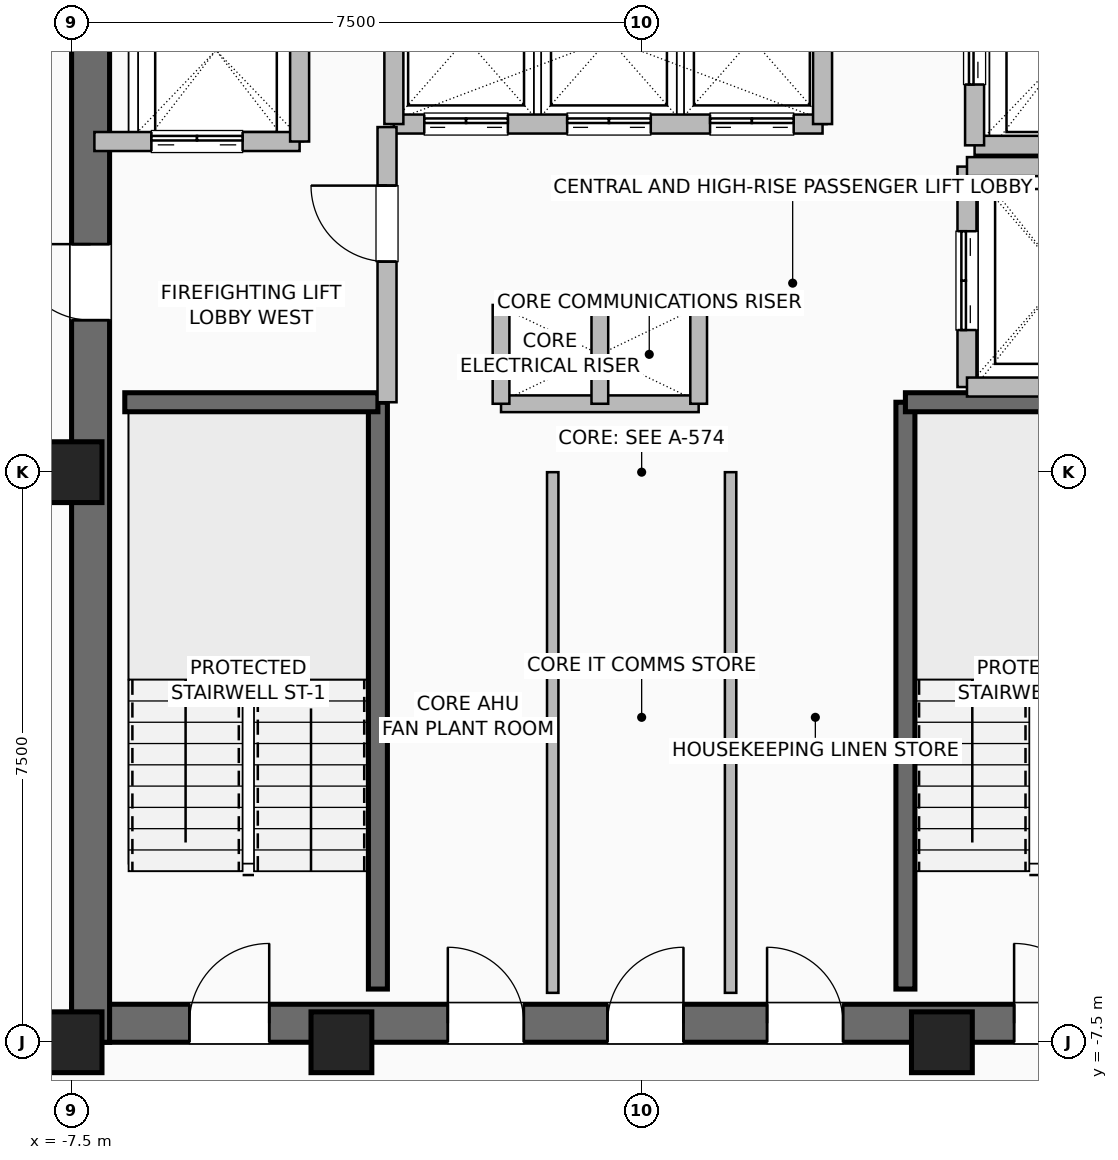
"""IFC4 building model, lengths in metres.
Left out: names, types, materials, properties, quantities, classifications, styles, units other than length and angle.
Written with IfcOpenShell. Run it as: python <this file> out.ifc"""

import sys

from ifc_helpers import new_model, si_unit, direction, frame, frame_2d, origin, origin_2d, place, context, subcontext, project, spatial, rectangle, hollow_rectangle, extrude, element, fill, save


model = new_model("IFC4")
c1 = context("Model", 3, precision=1e-05, world=origin(), true_north=direction((0.0, 1.0)))
c2 = subcontext(c1, "Body", "Model", "MODEL_VIEW")
j1 = project(units=[si_unit("LENGTHUNIT", "METRE"), si_unit("PLANEANGLEUNIT", "RADIAN")], contexts=[c1])
p1 = place(None, origin())
s1 = spatial("IfcSite", under=j1, at=p1, CompositionType="ELEMENT")
p2 = place(p1, origin())
s2 = spatial("IfcBuilding", under=s1, at=p2, CompositionType="ELEMENT")
p3 = place(p2, frame((0.0, 0.0, 293.6)))
s3 = spatial("IfcBuildingStorey", under=s2, at=p3, CompositionType="ELEMENT", Elevation=293.6)
for number, where, z_axis, x_axis in (
    (1, (-7.5, -7.5, 0.0), (0.0, 0.0, 1.0), (1.0, 0.0, 0.0)),
    (2, (-3.95, -7.5, 0.0), (0.0, 0.0, 1.0), (1.0, 0.0, 0.0)),
    (3, (3.95, -7.5, 0.0), (0.0, 0.0, 1.0), (1.0, 0.0, 0.0)),
    (4, (-7.5, 0.0, 0.0), (0.0, 0.0, 1.0), (1.0, 0.0, 0.0)),
):
    element("IfcColumn", number, at=place(p3, frame(where, z_axis=z_axis, x_axis=x_axis)), inside=s3, PredefinedType="COLUMN", context=c2, shape_type="SweptSolid", body=[
        extrude(hollow_rectangle(XDim=0.8, YDim=0.8, WallThickness=0.04, at=origin_2d()), origin(), (0.0, 0.0, 1.0), 3.6),
    ])
p4 = place(p3, frame((-7.5, -7.25, 0.0), z_axis=(0.0, 0.0, 1.0), x_axis=(1.0, 0.0, 0.0)))
e5 = element("IfcWall", 5, at=p4, inside=s3, PredefinedType="SHEAR", context=c2, shape_type="SweptSolid", body=[
    extrude(rectangle(XDim=15.0, YDim=0.5, at=frame_2d((7.5, 0.0))), origin(), (0.0, 0.0, 1.0), 3.36),
])
p5 = place(p4, frame((1.55, 0.0, 0.0)))
e6 = element("IfcOpeningElement", 6, at=p5, cuts=e5, PredefinedType="OPENING", context=c2, shape_type="SweptSolid", body=[
    extrude(rectangle(XDim=1.05, YDim=2.08, at=frame_2d((0.525, 1.04))), frame((0.0, 0.26, 0.0), z_axis=(0.0, -1.0, 0.0), x_axis=(1.0, 0.0, 0.0)), (0.0, 0.0, 1.0), 0.52),
])
p6 = place(p4, frame((12.4, 0.0, 0.0)))
e7 = element("IfcOpeningElement", 7, at=p6, cuts=e5, PredefinedType="OPENING", context=c2, shape_type="SweptSolid", body=[
    extrude(rectangle(XDim=1.05, YDim=2.08, at=frame_2d((0.525, 1.04))), frame((0.0, 0.26, 0.0), z_axis=(0.0, -1.0, 0.0), x_axis=(1.0, 0.0, 0.0)), (0.0, 0.0, 1.0), 0.52),
])
p7 = place(p4, frame((4.95, 0.0, 0.0)))
e8 = element("IfcOpeningElement", 8, at=p7, cuts=e5, PredefinedType="OPENING", context=c2, shape_type="SweptSolid", body=[
    extrude(rectangle(XDim=1.0, YDim=2.08, at=frame_2d((0.5, 1.04))), frame((0.0, 0.26, 0.0), z_axis=(0.0, -1.0, 0.0), x_axis=(1.0, 0.0, 0.0)), (0.0, 0.0, 1.0), 0.52),
])
p8 = place(p4, frame((7.05, 0.0, 0.0)))
e9 = element("IfcOpeningElement", 9, at=p8, cuts=e5, PredefinedType="OPENING", context=c2, shape_type="SweptSolid", body=[
    extrude(rectangle(XDim=1.0, YDim=2.08, at=frame_2d((0.5, 1.04))), frame((0.0, 0.26, 0.0), z_axis=(0.0, -1.0, 0.0), x_axis=(1.0, 0.0, 0.0)), (0.0, 0.0, 1.0), 0.52),
])
p9 = place(p4, frame((9.15, 0.0, 0.0)))
e10 = element("IfcOpeningElement", 10, at=p9, cuts=e5, PredefinedType="OPENING", context=c2, shape_type="SweptSolid", body=[
    extrude(rectangle(XDim=1.0, YDim=2.08, at=frame_2d((0.5, 1.04))), frame((0.0, 0.26, 0.0), z_axis=(0.0, -1.0, 0.0), x_axis=(1.0, 0.0, 0.0)), (0.0, 0.0, 1.0), 0.52),
])
p10 = place(p3, frame((-7.25, -7.5, 0.0), z_axis=(0.0, 0.0, 1.0), x_axis=(0.0, 1.0, 0.0)))
e11 = element("IfcWall", 11, at=p10, inside=s3, PredefinedType="SHEAR", context=c2, shape_type="SweptSolid", body=[
    extrude(rectangle(XDim=15.0, YDim=0.5, at=frame_2d((7.5, 0.0))), origin(), (0.0, 0.0, 1.0), 3.36),
])
p11 = place(p10, frame((9.5, 0.0, 0.0)))
e12 = element("IfcOpeningElement", 12, at=p11, cuts=e11, PredefinedType="OPENING", context=c2, shape_type="SweptSolid", body=[
    extrude(rectangle(XDim=1.0, YDim=2.08, at=frame_2d((0.5, 1.04))), frame((0.0, 0.26, 0.0), z_axis=(0.0, -1.0, 0.0), x_axis=(1.0, 0.0, 0.0)), (0.0, 0.0, 1.0), 0.52),
])
p12 = place(p3, frame((-3.47, -6.8, 0.0), z_axis=(0.0, 0.0, 1.0), x_axis=(0.0, 1.0, 0.0)))
e13 = element("IfcWall", 13, at=p12, inside=s3, PredefinedType="SHEAR", context=c2, shape_type="SweptSolid", body=[
    extrude(rectangle(XDim=7.72, YDim=0.25, at=frame_2d((3.86, 0.0))), origin(), (0.0, 0.0, 1.0), 3.36),
])
p13 = place(p3, frame((-6.8, 0.92, 0.0), z_axis=(0.0, 0.0, 1.0), x_axis=(1.0, 0.0, 0.0)))
e14 = element("IfcWall", 14, at=p13, inside=s3, PredefinedType="SHEAR", context=c2, shape_type="SweptSolid", body=[
    extrude(rectangle(XDim=3.33, YDim=0.25, at=frame_2d((1.665, 0.0))), origin(), (0.0, 0.0, 1.0), 3.36),
])
p14 = place(p3, frame((3.47, -6.8, 0.0), z_axis=(0.0, 0.0, 1.0), x_axis=(0.0, 1.0, 0.0)))
e15 = element("IfcWall", 15, at=p14, inside=s3, PredefinedType="SHEAR", context=c2, shape_type="SweptSolid", body=[
    extrude(rectangle(XDim=7.72, YDim=0.25, at=frame_2d((3.86, 0.0))), origin(), (0.0, 0.0, 1.0), 3.36),
])
p15 = place(p3, frame((3.47, 0.92, 0.0), z_axis=(0.0, 0.0, 1.0), x_axis=(1.0, 0.0, 0.0)))
e16 = element("IfcWall", 16, at=p15, inside=s3, PredefinedType="SHEAR", context=c2, shape_type="SweptSolid", body=[
    extrude(rectangle(XDim=3.33, YDim=0.25, at=frame_2d((1.665, 0.0))), origin(), (0.0, 0.0, 1.0), 3.36),
])
for number, where, z_axis, x_axis in (
    (17, (-1.85, 2.2, 0.0), (0.0, 0.0, 1.0), (1.0, 0.0, 0.0)),
    (18, (-1.85, 0.9, 0.0), (0.0, 0.0, 1.0), (1.0, 0.0, 0.0)),
):
    element("IfcWall", number, at=place(p3, frame(where, z_axis=z_axis, x_axis=x_axis)), inside=s3, PredefinedType="PARTITIONING", context=c2, shape_type="SweptSolid", body=[
        extrude(rectangle(XDim=2.6, YDim=0.22, at=frame_2d((1.3, 0.0))), origin(), (0.0, 0.0, 1.0), 3.36),
    ])
for number, where, z_axis, x_axis in (
    (19, (-0.55, 0.9, 0.0), (0.0, 0.0, 1.0), (0.0, 1.0, 0.0)),
    (20, (0.75, 0.9, 0.0), (0.0, 0.0, 1.0), (0.0, 1.0, 0.0)),
    (21, (-1.85, 0.9, 0.0), (0.0, 0.0, 1.0), (0.0, 1.0, 0.0)),
):
    element("IfcWall", number, at=place(p3, frame(where, z_axis=z_axis, x_axis=x_axis)), inside=s3, PredefinedType="PARTITIONING", context=c2, shape_type="SweptSolid", body=[
        extrude(rectangle(XDim=1.3, YDim=0.22, at=frame_2d((0.65, 0.0))), origin(), (0.0, 0.0, 1.0), 3.36),
    ])
p16 = place(p3, frame((-3.26, 4.58, 0.0), z_axis=(0.0, 0.0, 1.0), x_axis=(1.0, 0.0, 0.0)))
e22 = element("IfcWall", 22, at=p16, inside=s3, PredefinedType="SHEAR", context=c2, shape_type="SweptSolid", body=[
    extrude(rectangle(XDim=5.64, YDim=0.25, at=frame_2d((2.82, 0.0))), origin(), (0.0, 0.0, 1.0), 3.36),
])
p17 = place(p16, frame((0.4, 0.0, 0.0)))
e23 = element("IfcOpeningElement", 23, at=p17, cuts=e22, PredefinedType="OPENING", context=c2, shape_type="SweptSolid", body=[
    extrude(rectangle(XDim=1.1, YDim=2.2, at=frame_2d((0.55, 1.1))), frame((0.0, 0.135, 0.0), z_axis=(0.0, -1.0, 0.0), x_axis=(1.0, 0.0, 0.0)), (0.0, 0.0, 1.0), 0.27),
])
p18 = place(p16, frame((2.28, 0.0, 0.0)))
e24 = element("IfcOpeningElement", 24, at=p18, cuts=e22, PredefinedType="OPENING", context=c2, shape_type="SweptSolid", body=[
    extrude(rectangle(XDim=1.1, YDim=2.2, at=frame_2d((0.55, 1.1))), frame((0.0, 0.135, 0.0), z_axis=(0.0, -1.0, 0.0), x_axis=(1.0, 0.0, 0.0)), (0.0, 0.0, 1.0), 0.27),
])
p19 = place(p16, frame((4.16, 0.0, 0.0)))
e25 = element("IfcOpeningElement", 25, at=p19, cuts=e22, PredefinedType="OPENING", context=c2, shape_type="SweptSolid", body=[
    extrude(rectangle(XDim=1.1, YDim=2.2, at=frame_2d((0.55, 1.1))), frame((0.0, 0.135, 0.0), z_axis=(0.0, -1.0, 0.0), x_axis=(1.0, 0.0, 0.0)), (0.0, 0.0, 1.0), 0.27),
])
for number, where, z_axis, x_axis in (
    (26, (-3.26, 4.58, 0.0), (0.0, 0.0, 1.0), (0.0, 1.0, 0.0)),
    (27, (2.38, 4.58, 0.0), (0.0, 0.0, 1.0), (0.0, 1.0, 0.0)),
):
    element("IfcWall", number, at=place(p3, frame(where, z_axis=z_axis, x_axis=x_axis)), inside=s3, PredefinedType="SHEAR", context=c2, shape_type="SweptSolid", body=[
        extrude(rectangle(XDim=2.22, YDim=0.25, at=frame_2d((1.11, 0.0))), origin(), (0.0, 0.0, 1.0), 3.36),
    ])
p20 = place(p3, frame((-7.2, 4.35, 0.0), z_axis=(0.0, 0.0, 1.0), x_axis=(1.0, 0.0, 0.0)))
e28 = element("IfcWall", 28, at=p20, inside=s3, PredefinedType="SHEAR", context=c2, shape_type="SweptSolid", body=[
    extrude(rectangle(XDim=2.7, YDim=0.25, at=frame_2d((1.35, 0.0))), origin(), (0.0, 0.0, 1.0), 3.36),
])
p21 = place(p20, frame((0.75, 0.0, 0.0)))
e29 = element("IfcOpeningElement", 29, at=p21, cuts=e28, PredefinedType="OPENING", context=c2, shape_type="SweptSolid", body=[
    extrude(rectangle(XDim=1.2, YDim=2.2, at=frame_2d((0.6, 1.1))), frame((0.0, 0.135, 0.0), z_axis=(0.0, -1.0, 0.0), x_axis=(1.0, 0.0, 0.0)), (0.0, 0.0, 1.0), 0.27),
])
p22 = place(p3, frame((-4.5, 4.35, 0.0), z_axis=(0.0, 0.0, 1.0), x_axis=(0.0, 1.0, 0.0)))
e30 = element("IfcWall", 30, at=p22, inside=s3, PredefinedType="SHEAR", context=c2, shape_type="SweptSolid", body=[
    extrude(rectangle(XDim=2.85, YDim=0.25, at=frame_2d((1.425, 0.0))), origin(), (0.0, 0.0, 1.0), 3.36),
])
p23 = place(p3, frame((4.38, 4.3, 0.0), z_axis=(0.0, 0.0, 1.0), x_axis=(1.0, 0.0, 0.0)))
e31 = element("IfcWall", 31, at=p23, inside=s3, PredefinedType="SHEAR", context=c2, shape_type="SweptSolid", body=[
    extrude(rectangle(XDim=2.42, YDim=0.25, at=frame_2d((1.21, 0.0))), origin(), (0.0, 0.0, 1.0), 3.36),
])
p24 = place(p3, frame((4.38, 4.3, 0.0), z_axis=(0.0, 0.0, 1.0), x_axis=(0.0, 1.0, 0.0)))
e32 = element("IfcWall", 32, at=p24, inside=s3, PredefinedType="SHEAR", context=c2, shape_type="SweptSolid", body=[
    extrude(rectangle(XDim=2.5, YDim=0.25, at=frame_2d((1.25, 0.0))), origin(), (0.0, 0.0, 1.0), 3.36),
])
p25 = place(p24, frame((0.8, 0.0, 0.0)))
e33 = element("IfcOpeningElement", 33, at=p25, cuts=e32, PredefinedType="OPENING", context=c2, shape_type="SweptSolid", body=[
    extrude(rectangle(XDim=1.2, YDim=2.2, at=frame_2d((0.6, 1.1))), frame((0.0, 0.135, 0.0), z_axis=(0.0, -1.0, 0.0), x_axis=(1.0, 0.0, 0.0)), (0.0, 0.0, 1.0), 0.27),
])
p26 = place(p3, frame((4.28, 1.12, 0.0), z_axis=(0.0, 0.0, 1.0), x_axis=(0.0, 1.0, 0.0)))
e34 = element("IfcWall", 34, at=p26, inside=s3, PredefinedType="SHEAR", context=c2, shape_type="SweptSolid", body=[
    extrude(rectangle(XDim=2.9, YDim=0.25, at=frame_2d((1.45, 0.0))), origin(), (0.0, 0.0, 1.0), 3.36),
])
p27 = place(p26, frame((0.75, 0.0, 0.0)))
e35 = element("IfcOpeningElement", 35, at=p27, cuts=e34, PredefinedType="OPENING", context=c2, shape_type="SweptSolid", body=[
    extrude(rectangle(XDim=1.3, YDim=2.3, at=frame_2d((0.65, 1.15))), frame((0.0, 0.135, 0.0), z_axis=(0.0, -1.0, 0.0), x_axis=(1.0, 0.0, 0.0)), (0.0, 0.0, 1.0), 0.27),
])
for number, where, z_axis, x_axis in (
    (36, (4.28, 1.12, 0.0), (0.0, 0.0, 1.0), (1.0, 0.0, 0.0)),
    (37, (4.28, 4.02, 0.0), (0.0, 0.0, 1.0), (1.0, 0.0, 0.0)),
):
    element("IfcWall", number, at=place(p3, frame(where, z_axis=z_axis, x_axis=x_axis)), inside=s3, PredefinedType="SHEAR", context=c2, shape_type="SweptSolid", body=[
        extrude(rectangle(XDim=2.52, YDim=0.25, at=frame_2d((1.26, 0.0))), origin(), (0.0, 0.0, 1.0), 3.36),
    ])
p28 = place(p3, frame((-3.35, 0.92, 0.0), z_axis=(0.0, 0.0, 1.0), x_axis=(0.0, 1.0, 0.0)))
e38 = element("IfcWall", 38, at=p28, inside=s3, PredefinedType="SHEAR", context=c2, shape_type="SweptSolid", body=[
    extrude(rectangle(XDim=3.62, YDim=0.25, at=frame_2d((1.81, 0.0))), origin(), (0.0, 0.0, 1.0), 3.36),
])
p29 = place(p28, frame((1.85, 0.0, 0.0)))
e39 = element("IfcOpeningElement", 39, at=p29, cuts=e38, PredefinedType="OPENING", context=c2, shape_type="SweptSolid", body=[
    extrude(rectangle(XDim=1.0, YDim=2.08, at=frame_2d((0.5, 1.04))), frame((0.0, 0.135, 0.0), z_axis=(0.0, -1.0, 0.0), x_axis=(1.0, 0.0, 0.0)), (0.0, 0.0, 1.0), 0.27),
])
for number, where, z_axis, x_axis in (
    (40, (-1.17, -6.85, 0.0), (0.0, 0.0, 1.0), (0.0, 1.0, 0.0)),
    (41, (1.17, -6.85, 0.0), (0.0, 0.0, 1.0), (0.0, 1.0, 0.0)),
):
    element("IfcWall", number, at=place(p3, frame(where, z_axis=z_axis, x_axis=x_axis)), inside=s3, PredefinedType="PARTITIONING", context=c2, shape_type="SweptSolid", body=[
        extrude(rectangle(XDim=6.85, YDim=0.15, at=frame_2d((3.425, 0.0))), origin(), (0.0, 0.0, 1.0), 3.36),
    ])
p30 = place(p5, origin())
e42 = element("IfcDoor", 42, at=p30, inside=s3, OperationType="SINGLE_SWING_RIGHT", PredefinedType="DOOR", context=c2, shape_type="SweptSolid", body=[
    extrude(rectangle(XDim=1.05, YDim=2.08, at=frame_2d((0.525, 1.04))), frame((0.0, 0.025, 0.0), z_axis=(0.0, -1.0, 0.0), x_axis=(1.0, 0.0, 0.0)), (0.0, 0.0, 1.0), 0.05),
])
fill(e6, e42)
p31 = place(p6, origin())
e43 = element("IfcDoor", 43, at=p31, inside=s3, OperationType="SINGLE_SWING_LEFT", PredefinedType="DOOR", context=c2, shape_type="SweptSolid", body=[
    extrude(rectangle(XDim=1.05, YDim=2.08, at=frame_2d((0.525, 1.04))), frame((0.0, 0.025, 0.0), z_axis=(0.0, -1.0, 0.0), x_axis=(1.0, 0.0, 0.0)), (0.0, 0.0, 1.0), 0.05),
])
fill(e7, e43)
p32 = place(p11, origin())
e44 = element("IfcDoor", 44, at=p32, inside=s3, OperationType="SINGLE_SWING_RIGHT", PredefinedType="DOOR", context=c2, shape_type="SweptSolid", body=[
    extrude(rectangle(XDim=1.0, YDim=2.08, at=frame_2d((0.5, 1.04))), frame((0.0, 0.025, 0.0), z_axis=(0.0, -1.0, 0.0), x_axis=(1.0, 0.0, 0.0)), (0.0, 0.0, 1.0), 0.05),
])
fill(e12, e44)
p33 = place(p7, origin())
e45 = element("IfcDoor", 45, at=p33, inside=s3, OperationType="SINGLE_SWING_LEFT", PredefinedType="DOOR", context=c2, shape_type="SweptSolid", body=[
    extrude(rectangle(XDim=1.0, YDim=2.08, at=frame_2d((0.5, 1.04))), frame((0.0, 0.025, 0.0), z_axis=(0.0, -1.0, 0.0), x_axis=(1.0, 0.0, 0.0)), (0.0, 0.0, 1.0), 0.05),
])
fill(e8, e45)
p34 = place(p8, origin())
e46 = element("IfcDoor", 46, at=p34, inside=s3, OperationType="SINGLE_SWING_RIGHT", PredefinedType="DOOR", context=c2, shape_type="SweptSolid", body=[
    extrude(rectangle(XDim=1.0, YDim=2.08, at=frame_2d((0.5, 1.04))), frame((0.0, 0.025, 0.0), z_axis=(0.0, -1.0, 0.0), x_axis=(1.0, 0.0, 0.0)), (0.0, 0.0, 1.0), 0.05),
])
fill(e9, e46)
p35 = place(p9, origin())
e47 = element("IfcDoor", 47, at=p35, inside=s3, OperationType="SINGLE_SWING_LEFT", PredefinedType="DOOR", context=c2, shape_type="SweptSolid", body=[
    extrude(rectangle(XDim=1.0, YDim=2.08, at=frame_2d((0.5, 1.04))), frame((0.0, 0.025, 0.0), z_axis=(0.0, -1.0, 0.0), x_axis=(1.0, 0.0, 0.0)), (0.0, 0.0, 1.0), 0.05),
])
fill(e10, e47)
p36 = place(p17, origin())
e48 = element("IfcDoor", 48, at=p36, inside=s3, OperationType="DOUBLE_DOOR_SLIDING", PredefinedType="DOOR", context=c2, shape_type="SweptSolid", body=[
    extrude(rectangle(XDim=1.1, YDim=2.2, at=frame_2d((0.55, 1.1))), frame((0.0, 0.025, 0.0), z_axis=(0.0, -1.0, 0.0), x_axis=(1.0, 0.0, 0.0)), (0.0, 0.0, 1.0), 0.05),
])
fill(e23, e48)
p37 = place(p18, origin())
e49 = element("IfcDoor", 49, at=p37, inside=s3, OperationType="DOUBLE_DOOR_SLIDING", PredefinedType="DOOR", context=c2, shape_type="SweptSolid", body=[
    extrude(rectangle(XDim=1.1, YDim=2.2, at=frame_2d((0.55, 1.1))), frame((0.0, 0.025, 0.0), z_axis=(0.0, -1.0, 0.0), x_axis=(1.0, 0.0, 0.0)), (0.0, 0.0, 1.0), 0.05),
])
fill(e24, e49)
p38 = place(p19, origin())
e50 = element("IfcDoor", 50, at=p38, inside=s3, OperationType="DOUBLE_DOOR_SLIDING", PredefinedType="DOOR", context=c2, shape_type="SweptSolid", body=[
    extrude(rectangle(XDim=1.1, YDim=2.2, at=frame_2d((0.55, 1.1))), frame((0.0, 0.025, 0.0), z_axis=(0.0, -1.0, 0.0), x_axis=(1.0, 0.0, 0.0)), (0.0, 0.0, 1.0), 0.05),
])
fill(e25, e50)
p39 = place(p21, origin())
e51 = element("IfcDoor", 51, at=p39, inside=s3, OperationType="DOUBLE_DOOR_SLIDING", PredefinedType="DOOR", context=c2, shape_type="SweptSolid", body=[
    extrude(rectangle(XDim=1.2, YDim=2.2, at=frame_2d((0.6, 1.1))), frame((0.0, 0.025, 0.0), z_axis=(0.0, -1.0, 0.0), x_axis=(1.0, 0.0, 0.0)), (0.0, 0.0, 1.0), 0.05),
])
fill(e29, e51)
p40 = place(p25, origin())
e52 = element("IfcDoor", 52, at=p40, inside=s3, OperationType="DOUBLE_DOOR_SLIDING", PredefinedType="DOOR", context=c2, shape_type="SweptSolid", body=[
    extrude(rectangle(XDim=1.2, YDim=2.2, at=frame_2d((0.6, 1.1))), frame((0.0, 0.025, 0.0), z_axis=(0.0, -1.0, 0.0), x_axis=(1.0, 0.0, 0.0)), (0.0, 0.0, 1.0), 0.05),
])
fill(e33, e52)
p41 = place(p27, origin())
e53 = element("IfcDoor", 53, at=p41, inside=s3, OperationType="DOUBLE_DOOR_SLIDING", PredefinedType="DOOR", context=c2, shape_type="SweptSolid", body=[
    extrude(rectangle(XDim=1.3, YDim=2.3, at=frame_2d((0.65, 1.15))), frame((0.0, 0.025, 0.0), z_axis=(0.0, -1.0, 0.0), x_axis=(1.0, 0.0, 0.0)), (0.0, 0.0, 1.0), 0.05),
])
fill(e35, e53)
p42 = place(p29, origin())
e54 = element("IfcDoor", 54, at=p42, inside=s3, OperationType="SINGLE_SWING_RIGHT", PredefinedType="DOOR", context=c2, shape_type="SweptSolid", body=[
    extrude(rectangle(XDim=1.0, YDim=2.08, at=frame_2d((0.5, 1.04))), frame((0.0, 0.025, 0.0), z_axis=(0.0, -1.0, 0.0), x_axis=(1.0, 0.0, 0.0)), (0.0, 0.0, 1.0), 0.05),
])
fill(e39, e54)
save(model, sys.argv[1])
